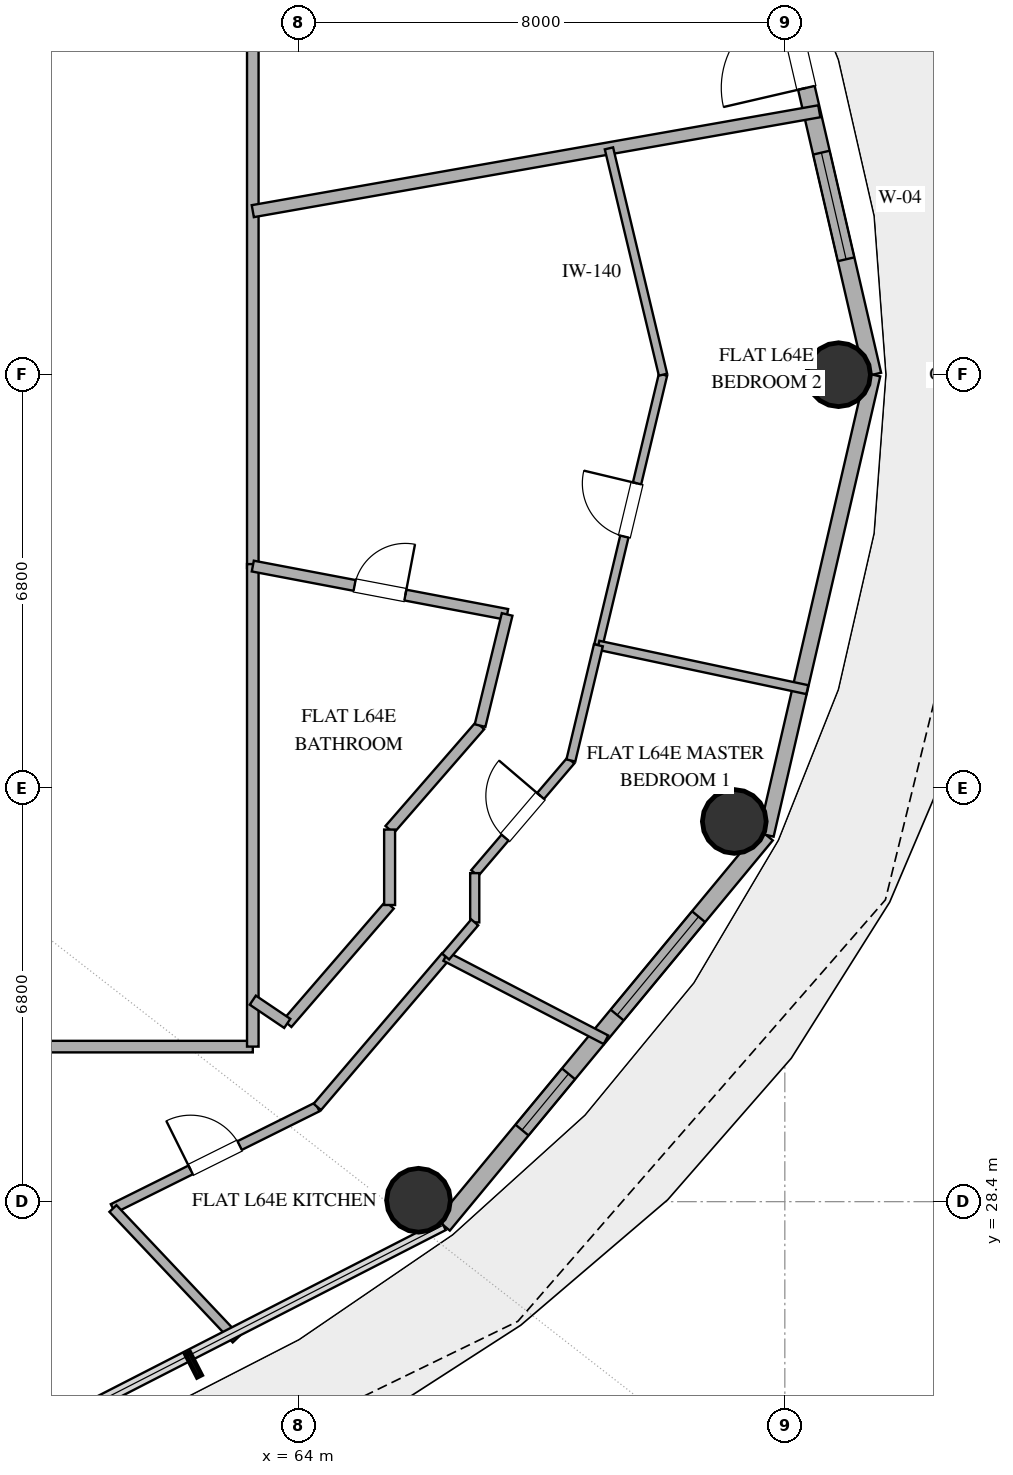
"""IFC4 building model, lengths in metres.
Left out: names, types, materials, properties, quantities, classifications, styles, units other than length and angle.
Written with IfcOpenShell. Run it as: python <this file> out.ifc"""

import sys

from ifc_helpers import new_model, si_unit, direction, frame, frame_2d, origin, origin_2d, place, context, subcontext, project, spatial, rectangle, hollow_circle, extrude, element, fill, save


model = new_model("IFC4")
c1 = context("Model", 3, precision=1e-05, world=origin(), true_north=direction((0.0, 1.0)))
c2 = subcontext(c1, "Body", "Model", "MODEL_VIEW")
j1 = project(units=[si_unit("LENGTHUNIT", "METRE"), si_unit("PLANEANGLEUNIT", "RADIAN")], contexts=[c1])
p1 = place(None, origin())
s1 = spatial("IfcSite", under=j1, at=p1, CompositionType="ELEMENT")
p2 = place(p1, origin())
s2 = spatial("IfcBuilding", under=s1, at=p2, CompositionType="ELEMENT")
p3 = place(p2, frame((0.0, 0.0, 249.6)))
s3 = spatial("IfcBuildingStorey", under=s2, at=p3, CompositionType="ELEMENT", Elevation=249.6)
for number, where, z_axis, x_axis in (
    (1, (72.883, 42.0, 0.0), (0.0, 0.0, 1.0), (1.0, 0.0, 0.0)),
    (2, (65.975, 28.424, 0.0), (0.0, 0.0, 1.0), (1.0, 0.0, 0.0)),
    (3, (71.169, 34.653, 0.0), (0.0, 0.0, 1.0), (1.0, 0.0, 0.0)),
):
    element("IfcColumn", number, at=place(p3, frame(where, z_axis=z_axis, x_axis=x_axis)), inside=s3, PredefinedType="COLUMN", context=c2, shape_type="SweptSolid", body=[
        extrude(hollow_circle(Radius=0.525, WallThickness=0.028, at=origin_2d()), origin(), (0.0, 0.0, 1.0), 3.36),
    ])
p4 = place(p3, frame((73.447, 42.0, 0.0), z_axis=(0.0, 0.0, 1.0), x_axis=(-0.225635078214, 0.974211892495, 0.0)))
e4 = element("IfcWall", 4, at=p4, inside=s3, PredefinedType="SOLIDWALL", context=c2, shape_type="SweptSolid", body=[
    extrude(rectangle(XDim=7.77, YDim=0.28, at=frame_2d((3.885, 0.0))), origin(), (0.0, 0.0, 1.0), 3.36),
])
p5 = place(p4, frame((1.948, 0.0, 0.85)))
e5 = element("IfcOpeningElement", 5, at=p5, cuts=e4, PredefinedType="OPENING", context=c2, shape_type="SweptSolid", body=[
    extrude(rectangle(XDim=1.8, YDim=2.2, at=frame_2d((0.9, 1.1))), frame((0.0, 0.15, 0.0), z_axis=(0.0, -1.0, 0.0), x_axis=(1.0, 0.0, 0.0)), (0.0, 0.0, 1.0), 0.3),
])
p6 = place(p4, frame((4.842, 0.0, 0.0)))
e6 = element("IfcOpeningElement", 6, at=p6, cuts=e4, PredefinedType="OPENING", context=c2, shape_type="SweptSolid", body=[
    extrude(rectangle(XDim=1.4, YDim=2.2, at=frame_2d((0.7, 1.1))), frame((0.0, 0.15, 0.0), z_axis=(0.0, -1.0, 0.0), x_axis=(1.0, 0.0, 0.0)), (0.0, 0.0, 1.0), 0.3),
])
p7 = place(p3, frame((66.383, 28.013, 0.0), z_axis=(0.0, 0.0, 1.0), x_axis=(0.63761509934, 0.770355103243, 0.0)))
e7 = element("IfcWall", 7, at=p7, inside=s3, PredefinedType="SOLIDWALL", context=c2, shape_type="SweptSolid", body=[
    extrude(rectangle(XDim=8.33, YDim=0.28, at=frame_2d((4.165, 0.0))), origin(), (0.0, 0.0, 1.0), 3.36),
])
p8 = place(p7, frame((2.031, 0.0, 0.85)))
e8 = element("IfcOpeningElement", 8, at=p8, cuts=e7, PredefinedType="OPENING", context=c2, shape_type="SweptSolid", body=[
    extrude(rectangle(XDim=1.2, YDim=1.6, at=frame_2d((0.6, 0.8))), frame((0.0, 0.15, 0.0), z_axis=(0.0, -1.0, 0.0), x_axis=(1.0, 0.0, 0.0)), (0.0, 0.0, 1.0), 0.3),
])
p9 = place(p7, frame((4.486, 0.0, 0.85)))
e9 = element("IfcOpeningElement", 9, at=p9, cuts=e7, PredefinedType="OPENING", context=c2, shape_type="SweptSolid", body=[
    extrude(rectangle(XDim=2.1, YDim=2.2, at=frame_2d((1.05, 1.1))), frame((0.0, 0.15, 0.0), z_axis=(0.0, -1.0, 0.0), x_axis=(1.0, 0.0, 0.0)), (0.0, 0.0, 1.0), 0.3),
])
p10 = place(p3, frame((71.694, 34.43, 0.0), z_axis=(0.0, 0.0, 1.0), x_axis=(0.225635078214, 0.974211892495, 0.0)))
e10 = element("IfcWall", 10, at=p10, inside=s3, PredefinedType="SOLIDWALL", context=c2, shape_type="SweptSolid", body=[
    extrude(rectangle(XDim=7.77, YDim=0.25, at=frame_2d((3.885, 0.0))), origin(), (0.0, 0.0, 1.0), 3.36),
])
p11 = place(p3, frame((63.25, 30.95, 0.0), z_axis=(0.0, 0.0, 1.0), x_axis=(-1.0, 0.0, 0.0)))
e11 = element("IfcWall", 11, at=p11, inside=s3, PredefinedType="PARTITIONING", context=c2, shape_type="SweptSolid", body=[
    extrude(rectangle(XDim=14.17, YDim=0.19, at=frame_2d((7.085, 0.0))), origin(), (0.0, 0.0, 1.0), 2.72),
])
p12 = place(p11, frame((5.967, 0.0, 0.0)))
e12 = element("IfcOpeningElement", 12, at=p12, cuts=e11, PredefinedType="OPENING", context=c2, shape_type="SweptSolid", body=[
    extrude(rectangle(XDim=1.0, YDim=2.2, at=frame_2d((0.5, 1.1))), frame((0.0, 0.105, 0.0), z_axis=(0.0, -1.0, 0.0), x_axis=(1.0, 0.0, 0.0)), (0.0, 0.0, 1.0), 0.21),
])
p13 = place(p3, frame((63.25, 53.05, 0.0), z_axis=(0.0, 0.0, 1.0), x_axis=(0.0, -1.0, 0.0)))
e13 = element("IfcWall", 13, at=p13, inside=s3, PredefinedType="PARTITIONING", context=c2, shape_type="SweptSolid", body=[
    extrude(rectangle(XDim=14.23, YDim=0.19, at=frame_2d((7.115, 0.0))), origin(), (0.0, 0.0, 1.0), 2.72),
])
p14 = place(p13, frame((3.697, 0.0, 0.0)))
e14 = element("IfcOpeningElement", 14, at=p14, cuts=e13, PredefinedType="OPENING", context=c2, shape_type="SweptSolid", body=[
    extrude(rectangle(XDim=1.0, YDim=2.2, at=frame_2d((0.5, 1.1))), frame((0.0, 0.105, 0.0), z_axis=(0.0, -1.0, 0.0), x_axis=(1.0, 0.0, 0.0)), (0.0, 0.0, 1.0), 0.21),
])
p15 = place(p3, frame((63.25, 38.885, 0.0), z_axis=(0.0, 0.0, 1.0), x_axis=(0.0, -1.0, 0.0)))
e15 = element("IfcWall", 15, at=p15, inside=s3, PredefinedType="PARTITIONING", context=c2, shape_type="SweptSolid", body=[
    extrude(rectangle(XDim=7.935, YDim=0.19, at=frame_2d((3.968, 0.0))), origin(), (0.0, 0.0, 1.0), 2.72),
])
p16 = place(p3, frame((63.25, 44.689, 0.0), z_axis=(0.0, 0.0, 1.0), x_axis=(0.984806931753, 0.173652835192, 0.0)))
e16 = element("IfcWall", 16, at=p16, inside=s3, PredefinedType="PARTITIONING", context=c2, shape_type="SweptSolid", body=[
    extrude(rectangle(XDim=9.46, YDim=0.2, at=frame_2d((4.73, 0.0))), origin(), (0.0, 0.0, 1.0), 2.72),
])
p17 = place(p3, frame((68.934, 37.55, 0.0), z_axis=(0.0, 0.0, 1.0), x_axis=(0.232301055554, 0.972643932582, 0.0)))
e17 = element("IfcWall", 17, at=p17, inside=s3, PredefinedType="PARTITIONING", context=c2, shape_type="SweptSolid", body=[
    extrude(rectangle(XDim=4.575, YDim=0.14, at=frame_2d((2.288, 0.0))), origin(), (0.0, 0.0, 1.0), 2.72),
])
p18 = place(p17, frame((1.837, 0.0, 0.0)))
e18 = element("IfcOpeningElement", 18, at=p18, cuts=e17, PredefinedType="OPENING", context=c2, shape_type="SweptSolid", body=[
    extrude(rectangle(XDim=0.9, YDim=2.1, at=frame_2d((0.45, 1.05))), frame((0.0, 0.08, 0.0), z_axis=(0.0, -1.0, 0.0), x_axis=(1.0, 0.0, 0.0)), (0.0, 0.0, 1.0), 0.16),
])
p19 = place(p3, frame((63.25, 38.852, 0.0), z_axis=(0.0, 0.0, 1.0), x_axis=(0.982414775925, -0.186711563764, 0.0)))
e19 = element("IfcWall", 19, at=p19, inside=s3, PredefinedType="PLUMBINGWALL", context=c2, shape_type="SweptSolid", body=[
    extrude(rectangle(XDim=4.258, YDim=0.18, at=frame_2d((2.129, 0.0))), origin(), (0.0, 0.0, 1.0), 2.72),
])
p20 = place(p19, frame((1.704, 0.0, 0.0)))
e20 = element("IfcOpeningElement", 20, at=p20, cuts=e19, PredefinedType="OPENING", context=c2, shape_type="SweptSolid", body=[
    extrude(rectangle(XDim=0.85, YDim=2.1, at=frame_2d((0.425, 1.05))), frame((0.0, 0.1, 0.0), z_axis=(0.0, -1.0, 0.0), x_axis=(1.0, 0.0, 0.0)), (0.0, 0.0, 1.0), 0.2),
])
p21 = place(p3, frame((69.996, 42.0, 0.0), z_axis=(0.0, 0.0, 1.0), x_axis=(-0.232313421965, 0.972640978972, 0.0)))
e21 = element("IfcWall", 21, at=p21, inside=s3, PredefinedType="PARTITIONING", context=c2, shape_type="SweptSolid", body=[
    extrude(rectangle(XDim=3.826, YDim=0.14, at=frame_2d((1.913, 0.0))), origin(), (0.0, 0.0, 1.0), 2.72),
])
p22 = place(p3, frame((60.95, 28.287, 0.0), z_axis=(0.0, 0.0, 1.0), x_axis=(0.895465553998, 0.445130814035, 0.0)))
e22 = element("IfcWall", 22, at=p22, inside=s3, PredefinedType="PLUMBINGWALL", context=c2, shape_type="SweptSolid", body=[
    extrude(rectangle(XDim=3.753, YDim=0.16, at=frame_2d((1.876, 0.0))), origin(), (0.0, 0.0, 1.0), 2.72),
])
p23 = place(p22, frame((1.427, 0.0, 0.0)))
e23 = element("IfcOpeningElement", 23, at=p23, cuts=e22, PredefinedType="OPENING", context=c2, shape_type="SweptSolid", body=[
    extrude(rectangle(XDim=0.9, YDim=2.1, at=frame_2d((0.45, 1.05))), frame((0.0, 0.09, 0.0), z_axis=(0.0, -1.0, 0.0), x_axis=(1.0, 0.0, 0.0)), (0.0, 0.0, 1.0), 0.18),
])
p24 = place(p3, frame((72.37, 36.82, 0.0), z_axis=(0.0, 0.0, 1.0), x_axis=(-0.978163972004, 0.20783465513, 0.0)))
e24 = element("IfcWall", 24, at=p24, inside=s3, PredefinedType="PARTITIONING", context=c2, shape_type="SweptSolid", body=[
    extrude(rectangle(XDim=3.513, YDim=0.15, at=frame_2d((1.757, 0.0))), origin(), (0.0, 0.0, 1.0), 2.72),
])
p25 = place(p3, frame((64.311, 29.958, 0.0), z_axis=(0.0, 0.0, 1.0), x_axis=(0.648959388132, 0.760823049437, 0.0)))
e25 = element("IfcWall", 25, at=p25, inside=s3, PredefinedType="PLUMBINGWALL", context=c2, shape_type="SweptSolid", body=[
    extrude(rectangle(XDim=3.252, YDim=0.16, at=frame_2d((1.626, 0.0))), origin(), (0.0, 0.0, 1.0), 2.72),
])
p26 = place(p3, frame((69.058, 31.062, 0.0), z_axis=(0.0, 0.0, 1.0), x_axis=(-0.887435973199, 0.460931007281, 0.0)))
e26 = element("IfcWall", 26, at=p26, inside=s3, PredefinedType="PLUMBINGWALL", context=c2, shape_type="SweptSolid", body=[
    extrude(rectangle(XDim=2.971, YDim=0.16, at=frame_2d((1.486, 0.0))), origin(), (0.0, 0.0, 1.0), 2.72),
])
p27 = place(p3, frame((62.978, 26.14, 0.0), z_axis=(0.0, 0.0, 1.0), x_axis=(-0.686565278446, 0.72706816629, 0.0)))
e27 = element("IfcWall", 27, at=p27, inside=s3, PredefinedType="PLUMBINGWALL", context=c2, shape_type="SweptSolid", body=[
    extrude(rectangle(XDim=2.954, YDim=0.16, at=frame_2d((1.477, 0.0))), origin(), (0.0, 0.0, 1.0), 2.72),
])
p28 = place(p3, frame((65.5, 33.279, 0.0), z_axis=(0.0, 0.0, 1.0), x_axis=(-0.653879119416, -0.756599033301, 0.0)))
e28 = element("IfcWall", 28, at=p28, inside=s3, PredefinedType="PLUMBINGWALL", context=c2, shape_type="SweptSolid", body=[
    extrude(rectangle(XDim=2.574, YDim=0.18, at=frame_2d((1.287, 0.0))), origin(), (0.0, 0.0, 1.0), 2.72),
])
p29 = place(p3, frame((66.9, 33.803, 0.0), z_axis=(0.0, 0.0, 1.0), x_axis=(0.649270866973, 0.760557257082, 0.0)))
e29 = element("IfcWall", 29, at=p29, inside=s3, PredefinedType="PARTITIONING", context=c2, shape_type="SweptSolid", body=[
    extrude(rectangle(XDim=2.435, YDim=0.15, at=frame_2d((1.218, 0.0))), origin(), (0.0, 0.0, 1.0), 2.72),
])
p30 = place(p29, frame((0.768, 0.0, 0.0)))
e30 = element("IfcOpeningElement", 30, at=p30, cuts=e29, PredefinedType="OPENING", context=c2, shape_type="SweptSolid", body=[
    extrude(rectangle(XDim=0.9, YDim=2.1, at=frame_2d((0.45, 1.05))), frame((0.0, 0.085, 0.0), z_axis=(0.0, -1.0, 0.0), x_axis=(1.0, 0.0, 0.0)), (0.0, 0.0, 1.0), 0.17),
])
p31 = place(p3, frame((66.988, 36.229, 0.0), z_axis=(0.0, 0.0, 1.0), x_axis=(-0.656389391797, -0.754422273224, 0.0)))
e31 = element("IfcWall", 31, at=p31, inside=s3, PredefinedType="PLUMBINGWALL", context=c2, shape_type="SweptSolid", body=[
    extrude(rectangle(XDim=2.266, YDim=0.18, at=frame_2d((1.133, 0.0))), origin(), (0.0, 0.0, 1.0), 2.72),
])
p32 = place(p3, frame((68.481, 35.655, 0.0), z_axis=(0.0, 0.0, 1.0), x_axis=(0.232292373483, 0.97264600612, 0.0)))
e32 = element("IfcWall", 32, at=p32, inside=s3, PredefinedType="PARTITIONING", context=c2, shape_type="SweptSolid", body=[
    extrude(rectangle(XDim=1.948, YDim=0.15, at=frame_2d((0.974, 0.0))), origin(), (0.0, 0.0, 1.0), 2.72),
])
p33 = place(p3, frame((67.433, 38.057, 0.0), z_axis=(0.0, 0.0, 1.0), x_axis=(-0.236517106823, -0.971627324739, 0.0)))
e33 = element("IfcWall", 33, at=p33, inside=s3, PredefinedType="PLUMBINGWALL", context=c2, shape_type="SweptSolid", body=[
    extrude(rectangle(XDim=1.882, YDim=0.18, at=frame_2d((0.941, 0.0))), origin(), (0.0, 0.0, 1.0), 2.72),
])
p34 = place(p3, frame((65.5, 34.519, 0.0), z_axis=(0.0, 0.0, 1.0), x_axis=(0.0, -1.0, 0.0)))
e34 = element("IfcWall", 34, at=p34, inside=s3, PredefinedType="PLUMBINGWALL", context=c2, shape_type="SweptSolid", body=[
    extrude(rectangle(XDim=1.24, YDim=0.18, at=frame_2d((0.62, 0.0))), origin(), (0.0, 0.0, 1.0), 2.72),
])
p35 = place(p3, frame((66.9, 32.993, 0.0), z_axis=(0.0, 0.0, 1.0), x_axis=(0.0, 1.0, 0.0)))
e35 = element("IfcWall", 35, at=p35, inside=s3, PredefinedType="PARTITIONING", context=c2, shape_type="SweptSolid", body=[
    extrude(rectangle(XDim=0.81, YDim=0.15, at=frame_2d((0.405, 0.0))), origin(), (0.0, 0.0, 1.0), 2.72),
])
p36 = place(p3, frame((66.421, 32.432, 0.0), z_axis=(0.0, 0.0, 1.0), x_axis=(0.649098829795, 0.760704087775, 0.0)))
e36 = element("IfcWall", 36, at=p36, inside=s3, PredefinedType="PARTITIONING", context=c2, shape_type="SweptSolid", body=[
    extrude(rectangle(XDim=0.737, YDim=0.15, at=frame_2d((0.369, 0.0))), origin(), (0.0, 0.0, 1.0), 2.72),
])
p37 = place(p3, frame((63.817, 31.331, 0.0), z_axis=(0.0, 0.0, 1.0), x_axis=(-0.829072128826, 0.559141668278, 0.0)))
e37 = element("IfcWall", 37, at=p37, inside=s3, PredefinedType="PLUMBINGWALL", context=c2, shape_type="SweptSolid", body=[
    extrude(rectangle(XDim=0.684, YDim=0.18, at=frame_2d((0.342, 0.0))), origin(), (0.0, 0.0, 1.0), 2.72),
])
p38 = place(p5, origin())
e38 = element("IfcWindow", 38, at=p38, inside=s3, PartitioningType="SINGLE_PANEL", PredefinedType="WINDOW", context=c2, shape_type="SweptSolid", body=[
    extrude(rectangle(XDim=1.8, YDim=2.2, at=frame_2d((0.9, 1.1))), frame((0.0, 0.03, 0.0), z_axis=(0.0, -1.0, 0.0), x_axis=(1.0, 0.0, 0.0)), (0.0, 0.0, 1.0), 0.06),
])
fill(e5, e38)
p39 = place(p6, origin())
e39 = element("IfcDoor", 39, at=p39, inside=s3, OperationType="SINGLE_SWING_LEFT", PredefinedType="DOOR", context=c2, shape_type="SweptSolid", body=[
    extrude(rectangle(XDim=1.4, YDim=2.2, at=frame_2d((0.7, 1.1))), frame((0.0, 0.025, 0.0), z_axis=(0.0, -1.0, 0.0), x_axis=(1.0, 0.0, 0.0)), (0.0, 0.0, 1.0), 0.05),
])
fill(e6, e39)
p40 = place(p8, origin())
e40 = element("IfcWindow", 40, at=p40, inside=s3, PartitioningType="SINGLE_PANEL", PredefinedType="WINDOW", context=c2, shape_type="SweptSolid", body=[
    extrude(rectangle(XDim=1.2, YDim=1.6, at=frame_2d((0.6, 0.8))), frame((0.0, 0.03, 0.0), z_axis=(0.0, -1.0, 0.0), x_axis=(1.0, 0.0, 0.0)), (0.0, 0.0, 1.0), 0.06),
])
fill(e8, e40)
p41 = place(p9, origin())
e41 = element("IfcWindow", 41, at=p41, inside=s3, PartitioningType="SINGLE_PANEL", PredefinedType="WINDOW", context=c2, shape_type="SweptSolid", body=[
    extrude(rectangle(XDim=2.1, YDim=2.2, at=frame_2d((1.05, 1.1))), frame((0.0, 0.03, 0.0), z_axis=(0.0, -1.0, 0.0), x_axis=(1.0, 0.0, 0.0)), (0.0, 0.0, 1.0), 0.06),
])
fill(e9, e41)
p42 = place(p18, origin())
e42 = element("IfcDoor", 42, at=p42, inside=s3, OperationType="SINGLE_SWING_RIGHT", PredefinedType="DOOR", context=c2, shape_type="SweptSolid", body=[
    extrude(rectangle(XDim=0.9, YDim=2.1, at=frame_2d((0.45, 1.05))), frame((0.0, 0.025, 0.0), z_axis=(0.0, -1.0, 0.0), x_axis=(1.0, 0.0, 0.0)), (0.0, 0.0, 1.0), 0.05),
])
fill(e18, e42)
p43 = place(p20, origin())
e43 = element("IfcDoor", 43, at=p43, inside=s3, OperationType="SINGLE_SWING_RIGHT", PredefinedType="DOOR", context=c2, shape_type="SweptSolid", body=[
    extrude(rectangle(XDim=0.85, YDim=2.1, at=frame_2d((0.425, 1.05))), frame((0.0, 0.025, 0.0), z_axis=(0.0, -1.0, 0.0), x_axis=(1.0, 0.0, 0.0)), (0.0, 0.0, 1.0), 0.05),
])
fill(e20, e43)
p44 = place(p23, origin())
e44 = element("IfcDoor", 44, at=p44, inside=s3, OperationType="SINGLE_SWING_LEFT", PredefinedType="DOOR", context=c2, shape_type="SweptSolid", body=[
    extrude(rectangle(XDim=0.9, YDim=2.1, at=frame_2d((0.45, 1.05))), frame((0.0, 0.025, 0.0), z_axis=(0.0, -1.0, 0.0), x_axis=(1.0, 0.0, 0.0)), (0.0, 0.0, 1.0), 0.05),
])
fill(e23, e44)
p45 = place(p30, origin())
e45 = element("IfcDoor", 45, at=p45, inside=s3, OperationType="SINGLE_SWING_RIGHT", PredefinedType="DOOR", context=c2, shape_type="SweptSolid", body=[
    extrude(rectangle(XDim=0.9, YDim=2.1, at=frame_2d((0.45, 1.05))), frame((0.0, 0.025, 0.0), z_axis=(0.0, -1.0, 0.0), x_axis=(1.0, 0.0, 0.0)), (0.0, 0.0, 1.0), 0.05),
])
fill(e30, e45)
save(model, sys.argv[1])
